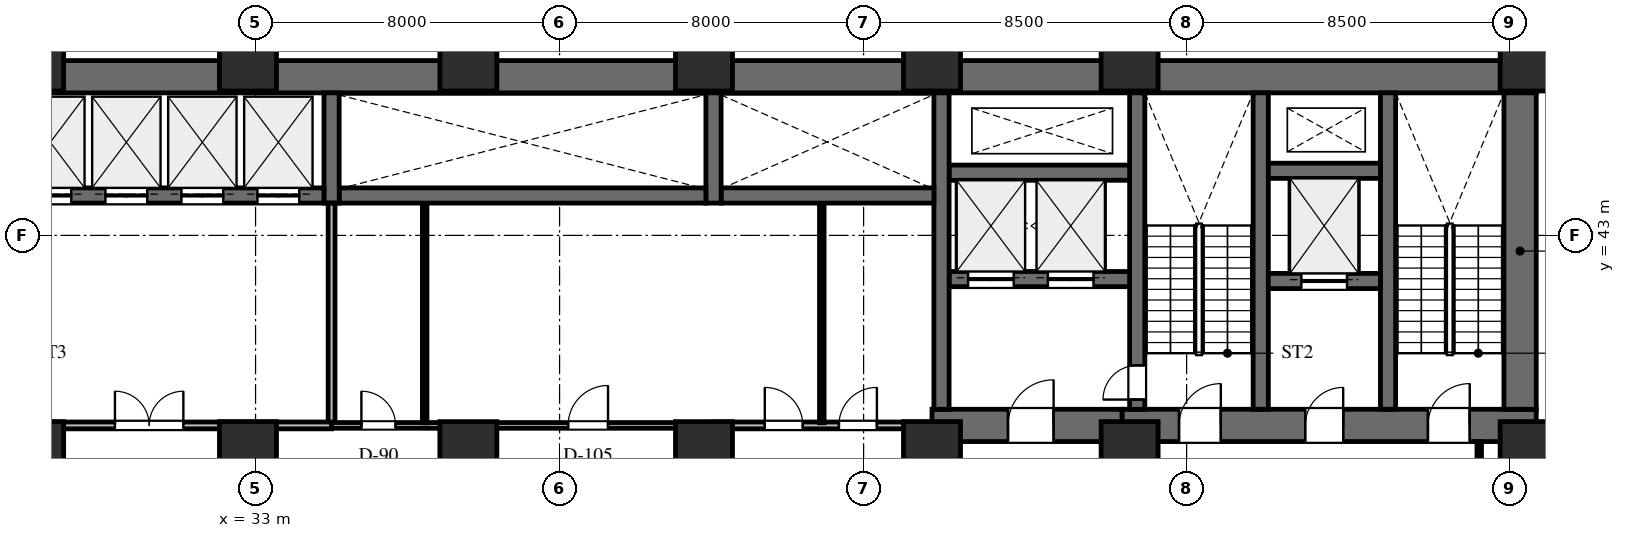
"""IFC4 building model, lengths in metres.
Left out: names, types, materials, properties, quantities, classifications, styles, units other than length and angle.
Written with IfcOpenShell. Run it as: python <this file> out.ifc"""

import sys

from ifc_helpers import new_model, si_unit, direction, frame, frame_2d, origin, origin_2d, place, context, subcontext, project, spatial, rectangle, extrude, element, fill, save


model = new_model("IFC4")
c1 = context("Model", 3, precision=1e-05, world=origin(), true_north=direction((0.0, 1.0)))
c2 = subcontext(c1, "Body", "Model", "MODEL_VIEW")
j1 = project(units=[si_unit("LENGTHUNIT", "METRE"), si_unit("PLANEANGLEUNIT", "RADIAN")], contexts=[c1])
p1 = place(None, origin())
s1 = spatial("IfcSite", under=j1, at=p1, CompositionType="ELEMENT")
p2 = place(p1, origin())
s2 = spatial("IfcBuilding", under=s1, at=p2, CompositionType="ELEMENT")
p3 = place(p2, frame((0.0, 0.0, 15.3)))
s3 = spatial("IfcBuildingStorey", under=s2, at=p3, CompositionType="ELEMENT", Elevation=15.3)
p4 = place(p3, frame((22.9, 47.175, 0.0), z_axis=(0.0, 0.0, 1.0), x_axis=(1.0, 0.0, 0.0)))
e1 = element("IfcWall", 1, at=p4, inside=s3, PredefinedType="SHEAR", context=c2, shape_type="SweptSolid", body=[
    extrude(rectangle(XDim=43.8, YDim=0.85, at=frame_2d((21.9, 0.0))), origin(), (0.0, 0.0, 1.0), 4.5),
])
p5 = place(p3, frame((55.8, 38.0, 0.0), z_axis=(0.0, 0.0, 1.0), x_axis=(1.0, 0.0, 0.0)))
e2 = element("IfcWall", 2, at=p5, inside=s3, PredefinedType="SHEAR", context=c2, shape_type="SweptSolid", body=[
    extrude(rectangle(XDim=10.9, YDim=0.85, at=frame_2d((5.45, 0.0))), origin(), (0.0, 0.0, 1.0), 4.5),
])
p6 = place(p5, frame((1.5, 0.0, 0.0)))
e3 = element("IfcOpeningElement", 3, at=p6, cuts=e2, PredefinedType="OPENING", context=c2, shape_type="SweptSolid", body=[
    extrude(rectangle(XDim=1.1, YDim=2.2, at=frame_2d((0.55, 1.1))), frame((0.0, 0.435, 0.0), z_axis=(0.0, -1.0, 0.0), x_axis=(1.0, 0.0, 0.0)), (0.0, 0.0, 1.0), 0.87),
])
p7 = place(p5, frame((4.82, 0.0, 0.0)))
e4 = element("IfcOpeningElement", 4, at=p7, cuts=e2, PredefinedType="OPENING", context=c2, shape_type="SweptSolid", body=[
    extrude(rectangle(XDim=1.0, YDim=2.15, at=frame_2d((0.5, 1.075))), frame((0.0, 0.435, 0.0), z_axis=(0.0, -1.0, 0.0), x_axis=(1.0, 0.0, 0.0)), (0.0, 0.0, 1.0), 0.87),
])
p8 = place(p5, frame((8.05, 0.0, 0.0)))
e5 = element("IfcOpeningElement", 5, at=p8, cuts=e2, PredefinedType="OPENING", context=c2, shape_type="SweptSolid", body=[
    extrude(rectangle(XDim=1.1, YDim=2.2, at=frame_2d((0.55, 1.1))), frame((0.0, 0.435, 0.0), z_axis=(0.0, -1.0, 0.0), x_axis=(1.0, 0.0, 0.0)), (0.0, 0.0, 1.0), 0.87),
])
p9 = place(p3, frame((66.275, 38.425, 0.0), z_axis=(0.0, 0.0, 1.0), x_axis=(0.0, 1.0, 0.0)))
e6 = element("IfcWall", 6, at=p9, inside=s3, PredefinedType="SHEAR", context=c2, shape_type="SweptSolid", body=[
    extrude(rectangle(XDim=8.325, YDim=0.85, at=frame_2d((4.163, 0.0))), origin(), (0.0, 0.0, 1.0), 4.5),
])
for number, where, z_axis, x_axis in (
    (7, (62.8, 38.425, 0.0), (0.0, 0.0, 1.0), (0.0, 1.0, 0.0)),
    (8, (59.45, 38.425, 0.0), (0.0, 0.0, 1.0), (0.0, 1.0, 0.0)),
):
    element("IfcWall", number, at=place(p3, frame(where, z_axis=z_axis, x_axis=x_axis)), inside=s3, PredefinedType="SHEAR", context=c2, shape_type="SweptSolid", body=[
        extrude(rectangle(XDim=8.325, YDim=0.4, at=frame_2d((4.163, 0.0))), origin(), (0.0, 0.0, 1.0), 4.5),
    ])
p10 = place(p3, frame((56.2, 38.425, 0.0), z_axis=(0.0, 0.0, 1.0), x_axis=(0.0, 1.0, 0.0)))
e9 = element("IfcWall", 9, at=p10, inside=s3, PredefinedType="SHEAR", context=c2, shape_type="SweptSolid", body=[
    extrude(rectangle(XDim=8.325, YDim=0.4, at=frame_2d((4.163, 0.0))), origin(), (0.0, 0.0, 1.0), 4.5),
])
p11 = place(p10, frame((0.255, 0.0, 0.0)))
e10 = element("IfcOpeningElement", 10, at=p11, cuts=e9, PredefinedType="OPENING", context=c2, shape_type="SweptSolid", body=[
    extrude(rectangle(XDim=0.9, YDim=2.15, at=frame_2d((0.45, 1.075))), frame((0.0, 0.21, 0.0), z_axis=(0.0, -1.0, 0.0), x_axis=(1.0, 0.0, 0.0)), (0.0, 0.0, 1.0), 0.42),
])
p12 = place(p3, frame((59.65, 41.8, 0.0), z_axis=(0.0, 0.0, 1.0), x_axis=(1.0, 0.0, 0.0)))
e11 = element("IfcWall", 11, at=p12, inside=s3, PredefinedType="SHEAR", context=c2, shape_type="SweptSolid", body=[
    extrude(rectangle(XDim=2.95, YDim=0.4, at=frame_2d((1.475, 0.0))), origin(), (0.0, 0.0, 1.0), 4.5),
])
p13 = place(p12, frame((0.87, 0.0, 0.0)))
e12 = element("IfcOpeningElement", 12, at=p13, cuts=e11, PredefinedType="OPENING", context=c2, shape_type="SweptSolid", body=[
    extrude(rectangle(XDim=1.2, YDim=2.2, at=frame_2d((0.6, 1.1))), frame((0.0, 0.21, 0.0), z_axis=(0.0, -1.0, 0.0), x_axis=(1.0, 0.0, 0.0)), (0.0, 0.0, 1.0), 0.42),
])
p14 = place(p3, frame((59.65, 44.7, 0.0), z_axis=(0.0, 0.0, 1.0), x_axis=(1.0, 0.0, 0.0)))
e13 = element("IfcWall", 13, at=p14, inside=s3, PredefinedType="SHEAR", context=c2, shape_type="SweptSolid", body=[
    extrude(rectangle(XDim=2.95, YDim=0.4, at=frame_2d((1.475, 0.0))), origin(), (0.0, 0.0, 1.0), 4.5),
])
p15 = place(p3, frame((50.8, 38.0, 0.0), z_axis=(0.0, 0.0, 1.0), x_axis=(1.0, 0.0, 0.0)))
e14 = element("IfcWall", 14, at=p15, inside=s3, PredefinedType="SHEAR", context=c2, shape_type="SweptSolid", body=[
    extrude(rectangle(XDim=5.0, YDim=0.85, at=frame_2d((2.5, 0.0))), origin(), (0.0, 0.0, 1.0), 4.5),
])
p16 = place(p15, frame((2.0, 0.0, 0.0)))
e15 = element("IfcOpeningElement", 15, at=p16, cuts=e14, PredefinedType="OPENING", context=c2, shape_type="SweptSolid", body=[
    extrude(rectangle(XDim=1.2, YDim=2.2, at=frame_2d((0.6, 1.1))), frame((0.0, 0.435, 0.0), z_axis=(0.0, -1.0, 0.0), x_axis=(1.0, 0.0, 0.0)), (0.0, 0.0, 1.0), 0.87),
])
p17 = place(p3, frame((51.25, 41.85, 0.0), z_axis=(0.0, 0.0, 1.0), x_axis=(1.0, 0.0, 0.0)))
e16 = element("IfcWall", 16, at=p17, inside=s3, PredefinedType="SHEAR", context=c2, shape_type="SweptSolid", body=[
    extrude(rectangle(XDim=4.75, YDim=0.4, at=frame_2d((2.375, 0.0))), origin(), (0.0, 0.0, 1.0), 4.5),
])
p18 = place(p17, frame((0.5, 0.0, 0.0)))
e17 = element("IfcOpeningElement", 17, at=p18, cuts=e16, PredefinedType="OPENING", context=c2, shape_type="SweptSolid", body=[
    extrude(rectangle(XDim=1.2, YDim=2.2, at=frame_2d((0.6, 1.1))), frame((0.0, 0.21, 0.0), z_axis=(0.0, -1.0, 0.0), x_axis=(1.0, 0.0, 0.0)), (0.0, 0.0, 1.0), 0.42),
])
p19 = place(p17, frame((2.6, 0.0, 0.0)))
e18 = element("IfcOpeningElement", 18, at=p19, cuts=e16, PredefinedType="OPENING", context=c2, shape_type="SweptSolid", body=[
    extrude(rectangle(XDim=1.2, YDim=2.2, at=frame_2d((0.6, 1.1))), frame((0.0, 0.21, 0.0), z_axis=(0.0, -1.0, 0.0), x_axis=(1.0, 0.0, 0.0)), (0.0, 0.0, 1.0), 0.42),
])
p20 = place(p3, frame((51.25, 44.65, 0.0), z_axis=(0.0, 0.0, 1.0), x_axis=(1.0, 0.0, 0.0)))
e19 = element("IfcWall", 19, at=p20, inside=s3, PredefinedType="SHEAR", context=c2, shape_type="SweptSolid", body=[
    extrude(rectangle(XDim=4.75, YDim=0.4, at=frame_2d((2.375, 0.0))), origin(), (0.0, 0.0, 1.0), 4.5),
])
p21 = place(p3, frame((51.05, 38.425, 0.0), z_axis=(0.0, 0.0, 1.0), x_axis=(0.0, 1.0, 0.0)))
e20 = element("IfcWall", 20, at=p21, inside=s3, PredefinedType="SHEAR", context=c2, shape_type="SweptSolid", body=[
    extrude(rectangle(XDim=8.325, YDim=0.4, at=frame_2d((4.163, 0.0))), origin(), (0.0, 0.0, 1.0), 4.5),
])
p22 = place(p3, frame((45.25, 44.05, 0.0), z_axis=(0.0, 0.0, 1.0), x_axis=(1.0, 0.0, 0.0)))
e21 = element("IfcWall", 21, at=p22, inside=s3, PredefinedType="SHEAR", context=c2, shape_type="SweptSolid", body=[
    extrude(rectangle(XDim=5.6, YDim=0.4, at=frame_2d((2.8, 0.0))), origin(), (0.0, 0.0, 1.0), 4.5),
])
p23 = place(p3, frame((45.05, 43.85, 0.0), z_axis=(0.0, 0.0, 1.0), x_axis=(0.0, 1.0, 0.0)))
e22 = element("IfcWall", 22, at=p23, inside=s3, PredefinedType="SHEAR", context=c2, shape_type="SweptSolid", body=[
    extrude(rectangle(XDim=2.9, YDim=0.4, at=frame_2d((1.45, 0.0))), origin(), (0.0, 0.0, 1.0), 4.5),
])
p24 = place(p3, frame((35.2, 44.05, 0.0), z_axis=(0.0, 0.0, 1.0), x_axis=(1.0, 0.0, 0.0)))
e23 = element("IfcWall", 23, at=p24, inside=s3, PredefinedType="SHEAR", context=c2, shape_type="SweptSolid", body=[
    extrude(rectangle(XDim=9.65, YDim=0.4, at=frame_2d((4.825, 0.0))), origin(), (0.0, 0.0, 1.0), 4.5),
])
p25 = place(p3, frame((35.0, 43.85, 0.0), z_axis=(0.0, 0.0, 1.0), x_axis=(0.0, 1.0, 0.0)))
e24 = element("IfcWall", 24, at=p25, inside=s3, PredefinedType="SHEAR", context=c2, shape_type="SweptSolid", body=[
    extrude(rectangle(XDim=2.9, YDim=0.4, at=frame_2d((1.45, 0.0))), origin(), (0.0, 0.0, 1.0), 4.5),
])
p26 = place(p3, frame((26.85, 44.05, 0.0), z_axis=(0.0, 0.0, 1.0), x_axis=(1.0, 0.0, 0.0)))
e25 = element("IfcWall", 25, at=p26, inside=s3, PredefinedType="SHEAR", context=c2, shape_type="SweptSolid", body=[
    extrude(rectangle(XDim=7.95, YDim=0.4, at=frame_2d((3.975, 0.0))), origin(), (0.0, 0.0, 1.0), 4.5),
])
p27 = place(p26, frame((0.2, 0.0, 0.0)))
e26 = element("IfcOpeningElement", 26, at=p27, cuts=e25, PredefinedType="OPENING", context=c2, shape_type="SweptSolid", body=[
    extrude(rectangle(XDim=1.1, YDim=2.2, at=frame_2d((0.55, 1.1))), frame((0.0, 0.21, 0.0), z_axis=(0.0, -1.0, 0.0), x_axis=(1.0, 0.0, 0.0)), (0.0, 0.0, 1.0), 0.42),
])
p28 = place(p26, frame((2.2, 0.0, 0.0)))
e27 = element("IfcOpeningElement", 27, at=p28, cuts=e25, PredefinedType="OPENING", context=c2, shape_type="SweptSolid", body=[
    extrude(rectangle(XDim=1.1, YDim=2.2, at=frame_2d((0.55, 1.1))), frame((0.0, 0.21, 0.0), z_axis=(0.0, -1.0, 0.0), x_axis=(1.0, 0.0, 0.0)), (0.0, 0.0, 1.0), 0.42),
])
p29 = place(p26, frame((4.2, 0.0, 0.0)))
e28 = element("IfcOpeningElement", 28, at=p29, cuts=e25, PredefinedType="OPENING", context=c2, shape_type="SweptSolid", body=[
    extrude(rectangle(XDim=1.1, YDim=2.2, at=frame_2d((0.55, 1.1))), frame((0.0, 0.21, 0.0), z_axis=(0.0, -1.0, 0.0), x_axis=(1.0, 0.0, 0.0)), (0.0, 0.0, 1.0), 0.42),
])
p30 = place(p26, frame((6.2, 0.0, 0.0)))
e29 = element("IfcOpeningElement", 29, at=p30, cuts=e25, PredefinedType="OPENING", context=c2, shape_type="SweptSolid", body=[
    extrude(rectangle(XDim=1.1, YDim=2.2, at=frame_2d((0.55, 1.1))), frame((0.0, 0.21, 0.0), z_axis=(0.0, -1.0, 0.0), x_axis=(1.0, 0.0, 0.0)), (0.0, 0.0, 1.0), 0.42),
])
for number, where, z_axis, x_axis in (
    (30, (66.5, 47.55, 0.0), (0.0, 0.0, 1.0), (1.0, 0.0, 0.0)),
    (31, (56.0, 47.55, 0.0), (0.0, 0.0, 1.0), (1.0, 0.0, 0.0)),
    (32, (66.5, 37.35, 0.0), (0.0, 0.0, 1.0), (1.0, 0.0, 0.0)),
    (33, (56.0, 37.35, 0.0), (0.0, 0.0, 1.0), (1.0, 0.0, 0.0)),
    (34, (50.8, 47.55, 0.0), (0.0, 0.0, 1.0), (1.0, 0.0, 0.0)),
    (35, (50.8, 37.35, 0.0), (0.0, 0.0, 1.0), (1.0, 0.0, 0.0)),
    (36, (44.8, 37.35, 0.0), (0.0, 0.0, 1.0), (1.0, 0.0, 0.0)),
    (37, (44.8, 47.55, 0.0), (0.0, 0.0, 1.0), (1.0, 0.0, 0.0)),
    (38, (38.6, 37.35, 0.0), (0.0, 0.0, 1.0), (1.0, 0.0, 0.0)),
    (39, (38.6, 47.55, 0.0), (0.0, 0.0, 1.0), (1.0, 0.0, 0.0)),
    (40, (32.8, 37.35, 0.0), (0.0, 0.0, 1.0), (1.0, 0.0, 0.0)),
    (41, (32.8, 47.55, 0.0), (0.0, 0.0, 1.0), (1.0, 0.0, 0.0)),
    (42, (27.2, 37.35, 0.0), (0.0, 0.0, 1.0), (1.0, 0.0, 0.0)),
    (43, (27.2, 47.55, 0.0), (0.0, 0.0, 1.0), (1.0, 0.0, 0.0)),
):
    element("IfcColumn", number, at=place(p3, frame(where, z_axis=z_axis, x_axis=x_axis)), inside=s3, PredefinedType="COLUMN", context=c2, shape_type="SweptSolid", body=[
        extrude(rectangle(XDim=1.5, YDim=1.5, at=origin_2d()), origin(), (0.0, 0.0, 1.0), 4.5),
    ])
p31 = place(p3, frame((45.05, 38.0, 0.0), z_axis=(0.0, 0.0, 1.0), x_axis=(1.0, 0.0, 0.0)))
e44 = element("IfcWall", 44, at=p31, inside=s3, PredefinedType="STANDARD", context=c2, shape_type="SweptSolid", body=[
    extrude(rectangle(XDim=5.75, YDim=0.18, at=frame_2d((2.875, 0.0))), origin(), (0.0, 0.0, 1.0), 3.282),
])
p32 = place(p31, frame((1.35, 0.0, 0.0)))
e45 = element("IfcOpeningElement", 45, at=p32, cuts=e44, PredefinedType="OPENING", context=c2, shape_type="SweptSolid", body=[
    extrude(rectangle(XDim=1.0, YDim=2.15, at=frame_2d((0.5, 1.075))), frame((0.0, 0.1, 0.0), z_axis=(0.0, -1.0, 0.0), x_axis=(1.0, 0.0, 0.0)), (0.0, 0.0, 1.0), 0.2),
])
p33 = place(p31, frame((3.3, 0.0, 0.0)))
e46 = element("IfcOpeningElement", 46, at=p33, cuts=e44, PredefinedType="OPENING", context=c2, shape_type="SweptSolid", body=[
    extrude(rectangle(XDim=1.0, YDim=2.15, at=frame_2d((0.5, 1.075))), frame((0.0, 0.1, 0.0), z_axis=(0.0, -1.0, 0.0), x_axis=(1.0, 0.0, 0.0)), (0.0, 0.0, 1.0), 0.2),
])
p34 = place(p3, frame((47.9, 38.068, 0.0), z_axis=(0.0, 0.0, 1.0), x_axis=(0.0, 1.0, 0.0)))
e47 = element("IfcWall", 47, at=p34, inside=s3, PredefinedType="PARTITIONING", context=c2, shape_type="SweptSolid", body=[
    extrude(rectangle(XDim=5.774, YDim=0.12, at=frame_2d((2.887, 0.0))), origin(), (0.0, 0.0, 1.0), 4.23),
])
p35 = place(p3, frame((35.0, 38.0, 0.0), z_axis=(0.0, 0.0, 1.0), x_axis=(0.0, 1.0, 0.0)))
e48 = element("IfcWall", 48, at=p35, inside=s3, PredefinedType="STANDARD", context=c2, shape_type="SweptSolid", body=[
    extrude(rectangle(XDim=5.85, YDim=0.18, at=frame_2d((2.925, 0.0))), origin(), (0.0, 0.0, 1.0), 4.23),
])
p36 = place(p3, frame((27.05, 38.0, 0.0), z_axis=(0.0, 0.0, 1.0), x_axis=(1.0, 0.0, 0.0)))
e49 = element("IfcWall", 49, at=p36, inside=s3, PredefinedType="STANDARD", context=c2, shape_type="SweptSolid", body=[
    extrude(rectangle(XDim=7.95, YDim=0.18, at=frame_2d((3.975, 0.0))), origin(), (0.0, 0.0, 1.0), 3.282),
])
p37 = place(p36, frame((2.25, 0.0, 0.0)))
e50 = element("IfcOpeningElement", 50, at=p37, cuts=e49, PredefinedType="OPENING", context=c2, shape_type="SweptSolid", body=[
    extrude(rectangle(XDim=1.8, YDim=2.2, at=frame_2d((0.9, 1.1))), frame((0.0, 0.1, 0.0), z_axis=(0.0, -1.0, 0.0), x_axis=(1.0, 0.0, 0.0)), (0.0, 0.0, 1.0), 0.2),
])
p38 = place(p3, frame((35.0, 38.0, 0.0), z_axis=(0.0, 0.0, 1.0), x_axis=(1.0, 0.0, 0.0)))
e51 = element("IfcWall", 51, at=p38, inside=s3, PredefinedType="PARTITIONING", context=c2, shape_type="SweptSolid", body=[
    extrude(rectangle(XDim=10.05, YDim=0.15, at=frame_2d((5.025, 0.0))), origin(), (0.0, 0.0, 1.0), 3.282),
])
p39 = place(p38, frame((0.785, 0.0, 0.0)))
e52 = element("IfcOpeningElement", 52, at=p39, cuts=e51, PredefinedType="OPENING", context=c2, shape_type="SweptSolid", body=[
    extrude(rectangle(XDim=0.9, YDim=2.1, at=frame_2d((0.45, 1.05))), frame((0.0, 0.085, 0.0), z_axis=(0.0, -1.0, 0.0), x_axis=(1.0, 0.0, 0.0)), (0.0, 0.0, 1.0), 0.17),
])
p40 = place(p38, frame((6.225, 0.0, 0.0)))
e53 = element("IfcOpeningElement", 53, at=p40, cuts=e51, PredefinedType="OPENING", context=c2, shape_type="SweptSolid", body=[
    extrude(rectangle(XDim=1.05, YDim=2.2, at=frame_2d((0.525, 1.1))), frame((0.0, 0.085, 0.0), z_axis=(0.0, -1.0, 0.0), x_axis=(1.0, 0.0, 0.0)), (0.0, 0.0, 1.0), 0.17),
])
p41 = place(p3, frame((37.45, 38.068, 0.0), z_axis=(0.0, 0.0, 1.0), x_axis=(0.0, 1.0, 0.0)))
e54 = element("IfcWall", 54, at=p41, inside=s3, PredefinedType="PARTITIONING", context=c2, shape_type="SweptSolid", body=[
    extrude(rectangle(XDim=5.774, YDim=0.12, at=frame_2d((2.887, 0.0))), origin(), (0.0, 0.0, 1.0), 4.23),
])
p42 = place(p3, frame((65.2, 34.4, 0.0), z_axis=(0.0, 0.0, 1.0), x_axis=(0.0, 1.0, 0.0)))
e55 = element("IfcWall", 55, at=p42, inside=s3, PredefinedType="PARTITIONING", context=c2, shape_type="SweptSolid", body=[
    extrude(rectangle(XDim=3.167, YDim=0.12, at=frame_2d((1.583, 0.0))), origin(), (0.0, 0.0, 1.0), 3.282),
])
p43 = place(p6, origin())
e56 = element("IfcDoor", 56, at=p43, inside=s3, OperationType="SINGLE_SWING_RIGHT", PredefinedType="DOOR", context=c2, shape_type="SweptSolid", body=[
    extrude(rectangle(XDim=1.1, YDim=2.2, at=frame_2d((0.55, 1.1))), frame((0.0, 0.025, 0.0), z_axis=(0.0, -1.0, 0.0), x_axis=(1.0, 0.0, 0.0)), (0.0, 0.0, 1.0), 0.05),
])
fill(e3, e56)
p44 = place(p7, origin())
e57 = element("IfcDoor", 57, at=p44, inside=s3, OperationType="SINGLE_SWING_RIGHT", PredefinedType="DOOR", context=c2, shape_type="SweptSolid", body=[
    extrude(rectangle(XDim=1.0, YDim=2.15, at=frame_2d((0.5, 1.075))), frame((0.0, 0.025, 0.0), z_axis=(0.0, -1.0, 0.0), x_axis=(1.0, 0.0, 0.0)), (0.0, 0.0, 1.0), 0.05),
])
fill(e4, e57)
p45 = place(p8, origin())
e58 = element("IfcDoor", 58, at=p45, inside=s3, OperationType="SINGLE_SWING_RIGHT", PredefinedType="DOOR", context=c2, shape_type="SweptSolid", body=[
    extrude(rectangle(XDim=1.1, YDim=2.2, at=frame_2d((0.55, 1.1))), frame((0.0, 0.025, 0.0), z_axis=(0.0, -1.0, 0.0), x_axis=(1.0, 0.0, 0.0)), (0.0, 0.0, 1.0), 0.05),
])
fill(e5, e58)
p46 = place(p16, origin())
e59 = element("IfcDoor", 59, at=p46, inside=s3, OperationType="SINGLE_SWING_RIGHT", PredefinedType="DOOR", context=c2, shape_type="SweptSolid", body=[
    extrude(rectangle(XDim=1.2, YDim=2.2, at=frame_2d((0.6, 1.1))), frame((0.0, 0.025, 0.0), z_axis=(0.0, -1.0, 0.0), x_axis=(1.0, 0.0, 0.0)), (0.0, 0.0, 1.0), 0.05),
])
fill(e15, e59)
p47 = place(p11, origin())
e60 = element("IfcDoor", 60, at=p47, inside=s3, OperationType="SINGLE_SWING_LEFT", PredefinedType="DOOR", context=c2, shape_type="SweptSolid", body=[
    extrude(rectangle(XDim=0.9, YDim=2.15, at=frame_2d((0.45, 1.075))), frame((0.0, 0.025, 0.0), z_axis=(0.0, -1.0, 0.0), x_axis=(1.0, 0.0, 0.0)), (0.0, 0.0, 1.0), 0.05),
])
fill(e10, e60)
p48 = place(p27, origin())
e61 = element("IfcDoor", 61, at=p48, inside=s3, OperationType="DOUBLE_DOOR_SLIDING", PredefinedType="DOOR", context=c2, shape_type="SweptSolid", body=[
    extrude(rectangle(XDim=1.1, YDim=2.2, at=frame_2d((0.55, 1.1))), frame((0.0, 0.025, 0.0), z_axis=(0.0, -1.0, 0.0), x_axis=(1.0, 0.0, 0.0)), (0.0, 0.0, 1.0), 0.05),
])
fill(e26, e61)
p49 = place(p28, origin())
e62 = element("IfcDoor", 62, at=p49, inside=s3, OperationType="DOUBLE_DOOR_SLIDING", PredefinedType="DOOR", context=c2, shape_type="SweptSolid", body=[
    extrude(rectangle(XDim=1.1, YDim=2.2, at=frame_2d((0.55, 1.1))), frame((0.0, 0.025, 0.0), z_axis=(0.0, -1.0, 0.0), x_axis=(1.0, 0.0, 0.0)), (0.0, 0.0, 1.0), 0.05),
])
fill(e27, e62)
p50 = place(p29, origin())
e63 = element("IfcDoor", 63, at=p50, inside=s3, OperationType="DOUBLE_DOOR_SLIDING", PredefinedType="DOOR", context=c2, shape_type="SweptSolid", body=[
    extrude(rectangle(XDim=1.1, YDim=2.2, at=frame_2d((0.55, 1.1))), frame((0.0, 0.025, 0.0), z_axis=(0.0, -1.0, 0.0), x_axis=(1.0, 0.0, 0.0)), (0.0, 0.0, 1.0), 0.05),
])
fill(e28, e63)
p51 = place(p30, origin())
e64 = element("IfcDoor", 64, at=p51, inside=s3, OperationType="DOUBLE_DOOR_SLIDING", PredefinedType="DOOR", context=c2, shape_type="SweptSolid", body=[
    extrude(rectangle(XDim=1.1, YDim=2.2, at=frame_2d((0.55, 1.1))), frame((0.0, 0.025, 0.0), z_axis=(0.0, -1.0, 0.0), x_axis=(1.0, 0.0, 0.0)), (0.0, 0.0, 1.0), 0.05),
])
fill(e29, e64)
p52 = place(p18, origin())
e65 = element("IfcDoor", 65, at=p52, inside=s3, OperationType="DOUBLE_DOOR_SLIDING", PredefinedType="DOOR", context=c2, shape_type="SweptSolid", body=[
    extrude(rectangle(XDim=1.2, YDim=2.2, at=frame_2d((0.6, 1.1))), frame((0.0, 0.025, 0.0), z_axis=(0.0, -1.0, 0.0), x_axis=(1.0, 0.0, 0.0)), (0.0, 0.0, 1.0), 0.05),
])
fill(e17, e65)
p53 = place(p19, origin())
e66 = element("IfcDoor", 66, at=p53, inside=s3, OperationType="DOUBLE_DOOR_SLIDING", PredefinedType="DOOR", context=c2, shape_type="SweptSolid", body=[
    extrude(rectangle(XDim=1.2, YDim=2.2, at=frame_2d((0.6, 1.1))), frame((0.0, 0.025, 0.0), z_axis=(0.0, -1.0, 0.0), x_axis=(1.0, 0.0, 0.0)), (0.0, 0.0, 1.0), 0.05),
])
fill(e18, e66)
p54 = place(p13, origin())
e67 = element("IfcDoor", 67, at=p54, inside=s3, OperationType="DOUBLE_DOOR_SLIDING", PredefinedType="DOOR", context=c2, shape_type="SweptSolid", body=[
    extrude(rectangle(XDim=1.2, YDim=2.2, at=frame_2d((0.6, 1.1))), frame((0.0, 0.025, 0.0), z_axis=(0.0, -1.0, 0.0), x_axis=(1.0, 0.0, 0.0)), (0.0, 0.0, 1.0), 0.05),
])
fill(e12, e67)
p55 = place(p32, origin())
e68 = element("IfcDoor", 68, at=p55, inside=s3, OperationType="SINGLE_SWING_LEFT", PredefinedType="DOOR", context=c2, shape_type="SweptSolid", body=[
    extrude(rectangle(XDim=1.0, YDim=2.15, at=frame_2d((0.5, 1.075))), frame((0.0, 0.025, 0.0), z_axis=(0.0, -1.0, 0.0), x_axis=(1.0, 0.0, 0.0)), (0.0, 0.0, 1.0), 0.05),
])
fill(e45, e68)
p56 = place(p33, origin())
e69 = element("IfcDoor", 69, at=p56, inside=s3, OperationType="SINGLE_SWING_RIGHT", PredefinedType="DOOR", context=c2, shape_type="SweptSolid", body=[
    extrude(rectangle(XDim=1.0, YDim=2.15, at=frame_2d((0.5, 1.075))), frame((0.0, 0.025, 0.0), z_axis=(0.0, -1.0, 0.0), x_axis=(1.0, 0.0, 0.0)), (0.0, 0.0, 1.0), 0.05),
])
fill(e46, e69)
p57 = place(p37, origin())
e70 = element("IfcDoor", 70, at=p57, inside=s3, OperationType="DOUBLE_DOOR_SINGLE_SWING", PredefinedType="DOOR", context=c2, shape_type="SweptSolid", body=[
    extrude(rectangle(XDim=1.8, YDim=2.2, at=frame_2d((0.9, 1.1))), frame((0.0, 0.025, 0.0), z_axis=(0.0, -1.0, 0.0), x_axis=(1.0, 0.0, 0.0)), (0.0, 0.0, 1.0), 0.05),
])
fill(e50, e70)
p58 = place(p39, origin())
e71 = element("IfcDoor", 71, at=p58, inside=s3, OperationType="SINGLE_SWING_LEFT", PredefinedType="DOOR", context=c2, shape_type="SweptSolid", body=[
    extrude(rectangle(XDim=0.9, YDim=2.1, at=frame_2d((0.45, 1.05))), frame((0.0, 0.025, 0.0), z_axis=(0.0, -1.0, 0.0), x_axis=(1.0, 0.0, 0.0)), (0.0, 0.0, 1.0), 0.05),
])
fill(e52, e71)
p59 = place(p40, origin())
e72 = element("IfcDoor", 72, at=p59, inside=s3, OperationType="SINGLE_SWING_RIGHT", PredefinedType="DOOR", context=c2, shape_type="SweptSolid", body=[
    extrude(rectangle(XDim=1.05, YDim=2.2, at=frame_2d((0.525, 1.1))), frame((0.0, 0.025, 0.0), z_axis=(0.0, -1.0, 0.0), x_axis=(1.0, 0.0, 0.0)), (0.0, 0.0, 1.0), 0.05),
])
fill(e53, e72)
save(model, sys.argv[1])
